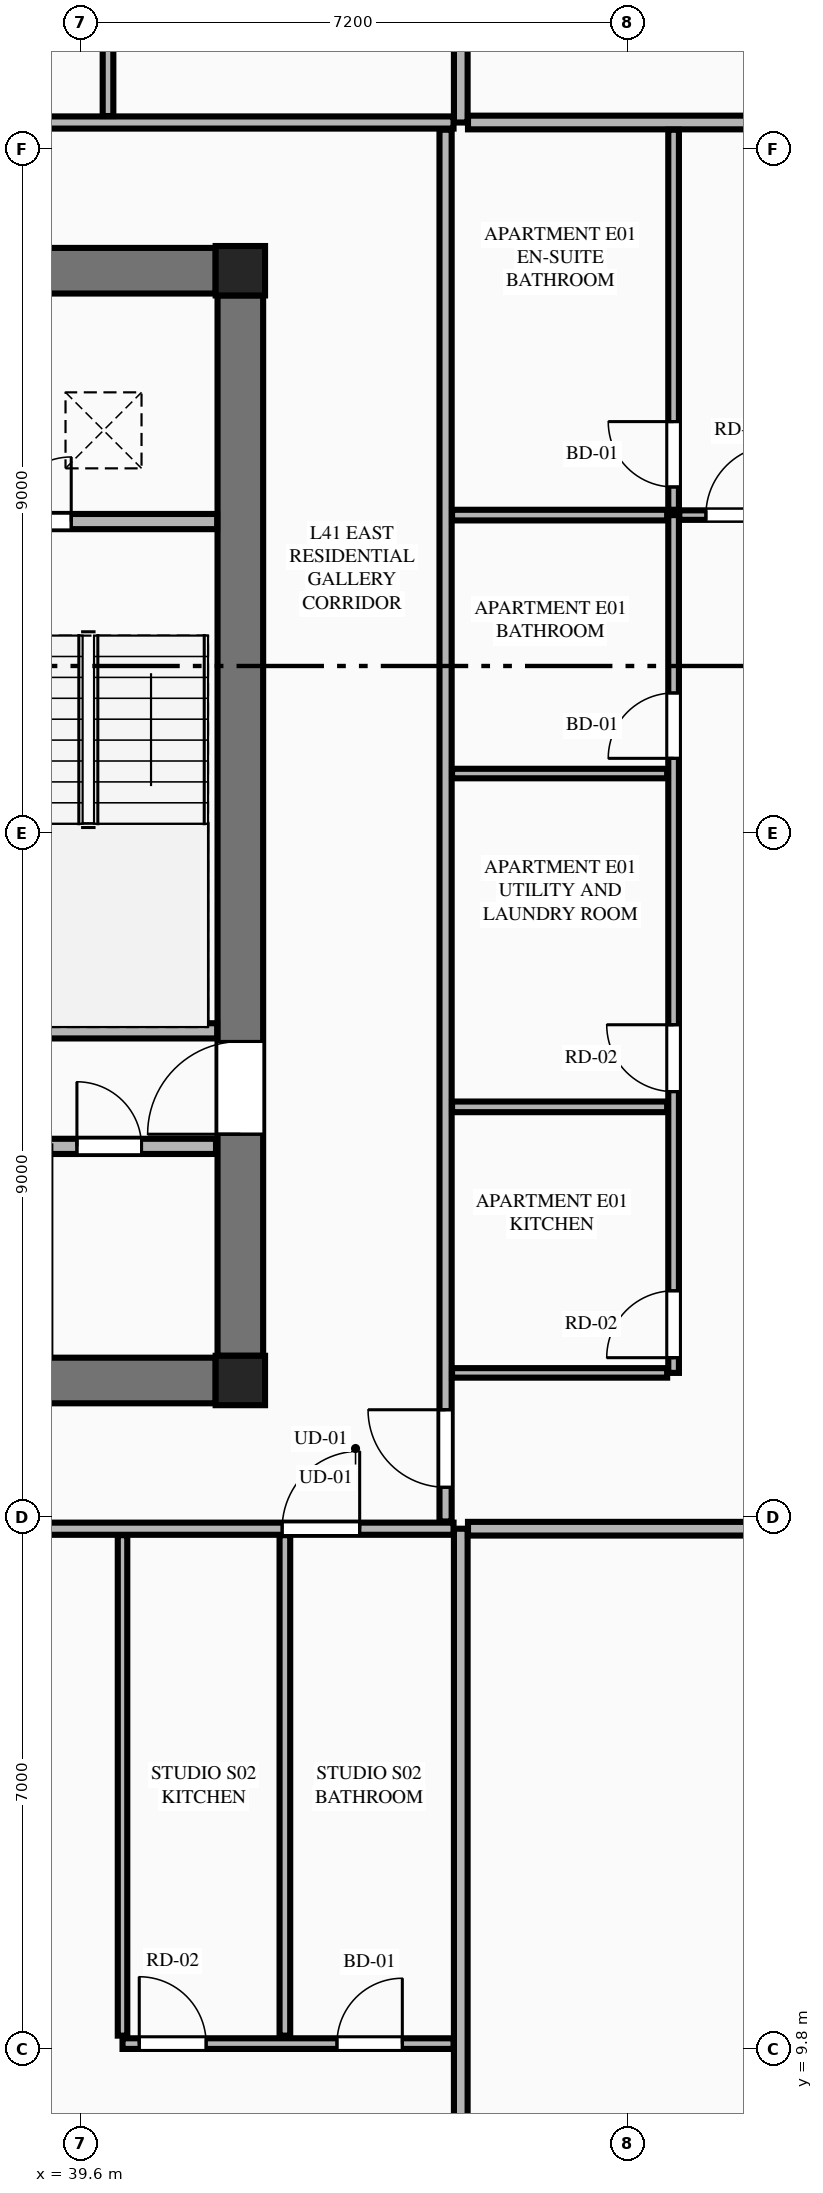
"""IFC4 building model, lengths in metres.
Left out: names, types, materials, properties, quantities, classifications, styles, units other than length and angle.
Written with IfcOpenShell. Run it as: python <this file> out.ifc"""

import sys

from ifc_helpers import new_model, si_unit, direction, frame, frame_2d, origin, origin_2d, place, context, subcontext, project, spatial, rectangle, extrude, element, fill, save


model = new_model("IFC4")
c1 = context("Model", 3, precision=1e-05, world=origin(), true_north=direction((0.0, 1.0)))
c2 = subcontext(c1, "Body", "Model", "MODEL_VIEW")
j1 = project(units=[si_unit("LENGTHUNIT", "METRE"), si_unit("PLANEANGLEUNIT", "RADIAN")], contexts=[c1])
p1 = place(None, origin())
s1 = spatial("IfcSite", under=j1, at=p1, CompositionType="ELEMENT")
p2 = place(p1, origin())
s2 = spatial("IfcBuilding", under=s1, at=p2, CompositionType="ELEMENT")
p3 = place(p2, frame((0.0, 0.0, 157.05)))
s3 = spatial("IfcBuildingStorey", under=s2, at=p3, CompositionType="ELEMENT", Elevation=157.05)
for number, where, z_axis, x_axis in (
    (1, (41.7, 18.6, 0.0), (0.0, 0.0, 1.0), (1.0, 0.0, 0.0)),
    (2, (41.7, 33.2, 0.0), (0.0, 0.0, 1.0), (1.0, 0.0, 0.0)),
):
    element("IfcColumn", number, at=place(p3, frame(where, z_axis=z_axis, x_axis=x_axis)), inside=s3, PredefinedType="COLUMN", context=c2, shape_type="SweptSolid", body=[
        extrude(rectangle(XDim=0.65, YDim=0.65, at=origin_2d()), origin(), (0.0, 0.0, 1.0), 3.55),
    ])
for number, where, z_axis, x_axis in (
    (3, (23.425, 18.6, 0.0), (0.0, 0.0, 1.0), (1.0, 0.0, 0.0)),
    (4, (23.425, 33.2, 0.0), (0.0, 0.0, 1.0), (1.0, 0.0, 0.0)),
):
    element("IfcWall", number, at=place(p3, frame(where, z_axis=z_axis, x_axis=x_axis)), inside=s3, PredefinedType="SHEAR", context=c2, shape_type="SweptSolid", body=[
        extrude(rectangle(XDim=17.95, YDim=0.6, at=frame_2d((8.975, 0.0))), origin(), (0.0, 0.0, 1.0), 3.34),
    ])
p4 = place(p3, frame((41.7, 18.925, 0.0), z_axis=(0.0, 0.0, 1.0), x_axis=(0.0, 1.0, 0.0)))
e5 = element("IfcWall", 5, at=p4, inside=s3, PredefinedType="SHEAR", context=c2, shape_type="SweptSolid", body=[
    extrude(rectangle(XDim=13.95, YDim=0.6, at=frame_2d((6.975, 0.0))), origin(), (0.0, 0.0, 1.0), 3.34),
])
p5 = place(p4, frame((2.915, 0.0, 0.0)))
e6 = element("IfcOpeningElement", 6, at=p5, cuts=e5, PredefinedType="OPENING", context=c2, shape_type="SweptSolid", body=[
    extrude(rectangle(XDim=1.22, YDim=2.25, at=frame_2d((0.61, 1.125))), frame((0.0, 0.31, 0.0), z_axis=(0.0, -1.0, 0.0), x_axis=(1.0, 0.0, 0.0)), (0.0, 0.0, 1.0), 0.62),
])
p6 = place(p3, frame((38.125, 23.2, 0.0), z_axis=(0.0, 0.0, 1.0), x_axis=(1.0, 0.0, 0.0)))
e7 = element("IfcWall", 7, at=p6, inside=s3, PredefinedType="PLUMBINGWALL", context=c2, shape_type="SweptSolid", body=[
    extrude(rectangle(XDim=3.27, YDim=0.2, at=frame_2d((1.635, 0.0))), origin(), (0.0, 0.0, 1.0), 3.34),
])
p7 = place(p3, frame((38.125, 29.9, 0.0), z_axis=(0.0, 0.0, 1.0), x_axis=(1.0, 0.0, 0.0)))
e8 = element("IfcWall", 8, at=p7, inside=s3, PredefinedType="PLUMBINGWALL", context=c2, shape_type="SweptSolid", body=[
    extrude(rectangle(XDim=3.27, YDim=0.2, at=frame_2d((1.635, 0.0))), origin(), (0.0, 0.0, 1.0), 3.34),
])
p8 = place(p7, frame((0.5, 0.0, 0.0)))
e9 = element("IfcOpeningElement", 9, at=p8, cuts=e8, PredefinedType="OPENING", context=c2, shape_type="SweptSolid", body=[
    extrude(rectangle(XDim=0.85, YDim=2.05, at=frame_2d((0.425, 1.025))), frame((0.0, 0.11, 0.0), z_axis=(0.0, -1.0, 0.0), x_axis=(1.0, 0.0, 0.0)), (0.0, 0.0, 1.0), 0.22),
])
p9 = place(p3, frame((23.42, 21.68, 0.0), z_axis=(0.0, 0.0, 1.0), x_axis=(1.0, 0.0, 0.0)))
e10 = element("IfcWall", 10, at=p9, inside=s3, PredefinedType="PLUMBINGWALL", context=c2, shape_type="SweptSolid", body=[
    extrude(rectangle(XDim=17.96, YDim=0.2, at=frame_2d((8.98, 0.0))), origin(), (0.0, 0.0, 1.0), 3.34),
])
p10 = place(p9, frame((11.6, 0.0, 0.0)))
e11 = element("IfcOpeningElement", 11, at=p10, cuts=e10, PredefinedType="OPENING", context=c2, shape_type="SweptSolid", body=[
    extrude(rectangle(XDim=1.1, YDim=2.2, at=frame_2d((0.55, 1.1))), frame((0.0, 0.11, 0.0), z_axis=(0.0, -1.0, 0.0), x_axis=(1.0, 0.0, 0.0)), (0.0, 0.0, 1.0), 0.22),
])
p11 = place(p9, frame((0.41, 0.0, 0.0)))
e12 = element("IfcOpeningElement", 12, at=p11, cuts=e10, PredefinedType="OPENING", context=c2, shape_type="SweptSolid", body=[
    extrude(rectangle(XDim=0.85, YDim=2.05, at=frame_2d((0.425, 1.025))), frame((0.0, 0.11, 0.0), z_axis=(0.0, -1.0, 0.0), x_axis=(1.0, 0.0, 0.0)), (0.0, 0.0, 1.0), 0.22),
])
p12 = place(p9, frame((13.78, 0.0, 0.0)))
e13 = element("IfcOpeningElement", 13, at=p12, cuts=e10, PredefinedType="OPENING", context=c2, shape_type="SweptSolid", body=[
    extrude(rectangle(XDim=0.85, YDim=2.05, at=frame_2d((0.425, 1.025))), frame((0.0, 0.11, 0.0), z_axis=(0.0, -1.0, 0.0), x_axis=(1.0, 0.0, 0.0)), (0.0, 0.0, 1.0), 0.22),
])
p13 = place(p9, frame((16.13, 0.0, 0.0)))
e14 = element("IfcOpeningElement", 14, at=p13, cuts=e10, PredefinedType="OPENING", context=c2, shape_type="SweptSolid", body=[
    extrude(rectangle(XDim=0.85, YDim=2.05, at=frame_2d((0.425, 1.025))), frame((0.0, 0.11, 0.0), z_axis=(0.0, -1.0, 0.0), x_axis=(1.0, 0.0, 0.0)), (0.0, 0.0, 1.0), 0.22),
])
p14 = place(p3, frame((47.937, 6.777, 0.0), z_axis=(0.0, 0.0, 1.0), x_axis=(0.451595734115, 0.892222670038, 0.0)))
e15 = element("IfcWall", 15, at=p14, inside=s3, PredefinedType="STANDARD", context=c2, shape_type="SweptSolid", body=[
    extrude(rectangle(XDim=5.208, YDim=0.34, at=frame_2d((2.604, 0.0))), origin(), (0.0, 0.0, 1.0), 2.797),
])
p15 = place(p14, frame((2.054, 0.0, 0.75)))
e16 = element("IfcOpeningElement", 16, at=p15, cuts=e15, PredefinedType="OPENING", context=c2, shape_type="SweptSolid", body=[
    extrude(rectangle(XDim=1.1, YDim=1.897, at=frame_2d((0.55, 0.948))), frame((0.0, 0.18, 0.0), z_axis=(0.0, -1.0, 0.0), x_axis=(1.0, 0.0, 0.0)), (0.0, 0.0, 1.0), 0.36),
])
p16 = place(p3, frame((44.6, 4.105, 0.0), z_axis=(0.0, 0.0, 1.0), x_axis=(0.0, 1.0, 0.0)))
e17 = element("IfcWall", 17, at=p16, inside=s3, PredefinedType="PARTITIONING", context=c2, shape_type="SweptSolid", body=[
    extrude(rectangle(XDim=12.545, YDim=0.18, at=frame_2d((6.272, 0.0))), origin(), (0.0, 0.0, 1.0), 3.34),
])
p17 = place(p3, frame((36.327, 16.65, 0.0), z_axis=(0.0, 0.0, 1.0), x_axis=(1.0, 0.0, 0.0)))
e18 = element("IfcWall", 18, at=p17, inside=s3, PredefinedType="PARTITIONING", context=c2, shape_type="SweptSolid", body=[
    extrude(rectangle(XDim=8.178, YDim=0.16, at=frame_2d((4.089, 0.0))), origin(), (0.0, 0.0, 1.0), 3.34),
])
p18 = place(p17, frame((5.923, 0.0, 0.0)))
e19 = element("IfcOpeningElement", 19, at=p18, cuts=e18, PredefinedType="OPENING", context=c2, shape_type="SweptSolid", body=[
    extrude(rectangle(XDim=1.02, YDim=2.25, at=frame_2d((0.51, 1.125))), frame((0.0, 0.09, 0.0), z_axis=(0.0, -1.0, 0.0), x_axis=(1.0, 0.0, 0.0)), (0.0, 0.0, 1.0), 0.18),
])
p19 = place(p3, frame((40.15, 9.981, 0.0), z_axis=(0.0, 0.0, 1.0), x_axis=(0.0, 1.0, 0.0)))
e20 = element("IfcWall", 20, at=p19, inside=s3, PredefinedType="PARTITIONING", context=c2, shape_type="SweptSolid", body=[
    extrude(rectangle(XDim=6.584, YDim=0.125, at=frame_2d((3.292, 0.0))), origin(), (0.0, 0.0, 1.0), 3.34),
])
p20 = place(p3, frame((40.15, 9.876, 0.0), z_axis=(0.0, 0.0, 1.0), x_axis=(1.0, 0.0, 0.0)))
e21 = element("IfcWall", 21, at=p20, inside=s3, PredefinedType="PLUMBINGWALL", context=c2, shape_type="SweptSolid", body=[
    extrude(rectangle(XDim=4.355, YDim=0.14, at=frame_2d((2.177, 0.0))), origin(), (0.0, 0.0, 1.0), 3.34),
])
p21 = place(p20, frame((2.821, 0.0, 0.0)))
e22 = element("IfcOpeningElement", 22, at=p21, cuts=e21, PredefinedType="OPENING", context=c2, shape_type="SweptSolid", body=[
    extrude(rectangle(XDim=0.86, YDim=2.1, at=frame_2d((0.43, 1.05))), frame((0.0, 0.08, 0.0), z_axis=(0.0, -1.0, 0.0), x_axis=(1.0, 0.0, 0.0)), (0.0, 0.0, 1.0), 0.16),
])
p22 = place(p20, frame((0.22, 0.0, 0.0)))
e23 = element("IfcOpeningElement", 23, at=p22, cuts=e21, PredefinedType="OPENING", context=c2, shape_type="SweptSolid", body=[
    extrude(rectangle(XDim=0.88, YDim=2.15, at=frame_2d((0.44, 1.075))), frame((0.0, 0.08, 0.0), z_axis=(0.0, -1.0, 0.0), x_axis=(1.0, 0.0, 0.0)), (0.0, 0.0, 1.0), 0.16),
])
p23 = place(p3, frame((42.286, 9.981, 0.0), z_axis=(0.0, 0.0, 1.0), x_axis=(0.0, 1.0, 0.0)))
e24 = element("IfcWall", 24, at=p23, inside=s3, PredefinedType="PLUMBINGWALL", context=c2, shape_type="SweptSolid", body=[
    extrude(rectangle(XDim=6.584, YDim=0.14, at=frame_2d((3.292, 0.0))), origin(), (0.0, 0.0, 1.0), 2.722),
])
p24 = place(p3, frame((44.6, 35.15, 0.0), z_axis=(0.0, 0.0, 1.0), x_axis=(0.0, 1.0, 0.0)))
e25 = element("IfcWall", 25, at=p24, inside=s3, PredefinedType="PARTITIONING", context=c2, shape_type="SweptSolid", body=[
    extrude(rectangle(XDim=12.345, YDim=0.18, at=frame_2d((6.173, 0.0))), origin(), (0.0, 0.0, 1.0), 3.34),
])
p25 = place(p3, frame((20.295, 35.15, 0.0), z_axis=(0.0, 0.0, 1.0), x_axis=(1.0, 0.0, 0.0)))
e26 = element("IfcWall", 26, at=p25, inside=s3, PredefinedType="PARTITIONING", context=c2, shape_type="SweptSolid", body=[
    extrude(rectangle(XDim=24.21, YDim=0.16, at=frame_2d((12.105, 0.0))), origin(), (0.0, 0.0, 1.0), 3.34),
])
p26 = place(p25, frame((0.405, 0.0, 0.0)))
e27 = element("IfcOpeningElement", 27, at=p26, cuts=e26, PredefinedType="OPENING", context=c2, shape_type="SweptSolid", body=[
    extrude(rectangle(XDim=1.35, YDim=2.35, at=frame_2d((0.675, 1.175))), frame((0.0, 0.09, 0.0), z_axis=(0.0, -1.0, 0.0), x_axis=(1.0, 0.0, 0.0)), (0.0, 0.0, 1.0), 0.18),
])
p27 = place(p3, frame((39.959, 35.235, 0.0), z_axis=(0.0, 0.0, 1.0), x_axis=(0.0, 1.0, 0.0)))
e28 = element("IfcWall", 28, at=p27, inside=s3, PredefinedType="PLUMBINGWALL", context=c2, shape_type="SweptSolid", body=[
    extrude(rectangle(XDim=4.625, YDim=0.14, at=frame_2d((2.312, 0.0))), origin(), (0.0, 0.0, 1.0), 3.34),
])
p28 = place(p3, frame((44.695, 16.65, 0.0), z_axis=(0.0, 0.0, 1.0), x_axis=(1.0, 0.0, 0.0)))
e29 = element("IfcWall", 29, at=p28, inside=s3, PredefinedType="PARTITIONING", context=c2, shape_type="SweptSolid", body=[
    extrude(rectangle(XDim=7.996, YDim=0.18, at=frame_2d((3.998, 0.0))), origin(), (0.0, 0.0, 1.0), 3.34),
])
p29 = place(p3, frame((44.695, 35.15, 0.0), z_axis=(0.0, 0.0, 1.0), x_axis=(1.0, 0.0, 0.0)))
e30 = element("IfcWall", 30, at=p29, inside=s3, PredefinedType="PARTITIONING", context=c2, shape_type="SweptSolid", body=[
    extrude(rectangle(XDim=7.895, YDim=0.18, at=frame_2d((3.948, 0.0))), origin(), (0.0, 0.0, 1.0), 3.34),
])
p30 = place(p3, frame((44.4, 16.745, 0.0), z_axis=(0.0, 0.0, 1.0), x_axis=(0.0, 1.0, 0.0)))
e31 = element("IfcWall", 31, at=p30, inside=s3, PredefinedType="PARTITIONING", context=c2, shape_type="SweptSolid", body=[
    extrude(rectangle(XDim=18.31, YDim=0.16, at=frame_2d((9.155, 0.0))), origin(), (0.0, 0.0, 1.0), 3.34),
])
p31 = place(p30, frame((0.45, 0.0, 0.0)))
e32 = element("IfcOpeningElement", 32, at=p31, cuts=e31, PredefinedType="OPENING", context=c2, shape_type="SweptSolid", body=[
    extrude(rectangle(XDim=1.02, YDim=2.25, at=frame_2d((0.51, 1.125))), frame((0.0, 0.09, 0.0), z_axis=(0.0, -1.0, 0.0), x_axis=(1.0, 0.0, 0.0)), (0.0, 0.0, 1.0), 0.18),
])
p32 = place(p3, frame((44.485, 18.7, 0.0), z_axis=(0.0, 0.0, 1.0), x_axis=(1.0, 0.0, 0.0)))
e33 = element("IfcWall", 33, at=p32, inside=s3, PredefinedType="PARTITIONING", context=c2, shape_type="SweptSolid", body=[
    extrude(rectangle(XDim=2.83, YDim=0.125, at=frame_2d((1.415, 0.0))), origin(), (0.0, 0.0, 1.0), 2.722),
])
p33 = place(p3, frame((47.4, 18.7, 0.0), z_axis=(0.0, 0.0, 1.0), x_axis=(0.0, 1.0, 0.0)))
e34 = element("IfcWall", 34, at=p33, inside=s3, PredefinedType="PLUMBINGWALL", context=c2, shape_type="SweptSolid", body=[
    extrude(rectangle(XDim=11.285, YDim=0.14, at=frame_2d((5.643, 0.0))), origin(), (0.0, 0.0, 1.0), 3.34),
])
p34 = place(p33, frame((0.2, 0.0, 0.0)))
e35 = element("IfcOpeningElement", 35, at=p34, cuts=e34, PredefinedType="OPENING", context=c2, shape_type="SweptSolid", body=[
    extrude(rectangle(XDim=0.88, YDim=2.15, at=frame_2d((0.44, 1.075))), frame((0.0, 0.08, 0.0), z_axis=(0.0, -1.0, 0.0), x_axis=(1.0, 0.0, 0.0)), (0.0, 0.0, 1.0), 0.16),
])
p35 = place(p33, frame((3.7, 0.0, 0.0)))
e36 = element("IfcOpeningElement", 36, at=p35, cuts=e34, PredefinedType="OPENING", context=c2, shape_type="SweptSolid", body=[
    extrude(rectangle(XDim=0.88, YDim=2.15, at=frame_2d((0.44, 1.075))), frame((0.0, 0.08, 0.0), z_axis=(0.0, -1.0, 0.0), x_axis=(1.0, 0.0, 0.0)), (0.0, 0.0, 1.0), 0.16),
])
p36 = place(p33, frame((8.085, 0.0, 0.0)))
e37 = element("IfcOpeningElement", 37, at=p36, cuts=e34, PredefinedType="OPENING", context=c2, shape_type="SweptSolid", body=[
    extrude(rectangle(XDim=0.86, YDim=2.1, at=frame_2d((0.43, 1.05))), frame((0.0, 0.08, 0.0), z_axis=(0.0, -1.0, 0.0), x_axis=(1.0, 0.0, 0.0)), (0.0, 0.0, 1.0), 0.16),
])
p37 = place(p3, frame((47.4, 30.055, 0.0), z_axis=(0.0, 0.0, 1.0), x_axis=(0.0, 1.0, 0.0)))
e38 = element("IfcWall", 38, at=p37, inside=s3, PredefinedType="PLUMBINGWALL", context=c2, shape_type="SweptSolid", body=[
    extrude(rectangle(XDim=5.0, YDim=0.14, at=frame_2d((2.5, 0.0))), origin(), (0.0, 0.0, 1.0), 3.34),
])
p38 = place(p37, frame((0.3, 0.0, 0.0)))
e39 = element("IfcOpeningElement", 39, at=p38, cuts=e38, PredefinedType="OPENING", context=c2, shape_type="SweptSolid", body=[
    extrude(rectangle(XDim=0.86, YDim=2.1, at=frame_2d((0.43, 1.05))), frame((0.0, 0.08, 0.0), z_axis=(0.0, -1.0, 0.0), x_axis=(1.0, 0.0, 0.0)), (0.0, 0.0, 1.0), 0.16),
])
p39 = place(p3, frame((44.485, 29.985, 0.0), z_axis=(0.0, 0.0, 1.0), x_axis=(1.0, 0.0, 0.0)))
e40 = element("IfcWall", 40, at=p39, inside=s3, PredefinedType="PLUMBINGWALL", context=c2, shape_type="SweptSolid", body=[
    extrude(rectangle(XDim=2.83, YDim=0.14, at=frame_2d((1.415, 0.0))), origin(), (0.0, 0.0, 1.0), 3.34),
])
p40 = place(p3, frame((47.475, 29.985, 0.0), z_axis=(0.0, 0.0, 1.0), x_axis=(1.0, 0.0, 0.0)))
e41 = element("IfcWall", 41, at=p40, inside=s3, PredefinedType="PARTITIONING", context=c2, shape_type="SweptSolid", body=[
    extrude(rectangle(XDim=7.743, YDim=0.125, at=frame_2d((3.872, 0.0))), origin(), (0.0, 0.0, 1.0), 3.34),
])
p41 = place(p40, frame((0.35, 0.0, 0.0)))
e42 = element("IfcOpeningElement", 42, at=p41, cuts=e41, PredefinedType="OPENING", context=c2, shape_type="SweptSolid", body=[
    extrude(rectangle(XDim=0.92, YDim=2.15, at=frame_2d((0.46, 1.075))), frame((0.0, 0.073, 0.0), z_axis=(0.0, -1.0, 0.0), x_axis=(1.0, 0.0, 0.0)), (0.0, 0.0, 1.0), 0.145),
])
p42 = place(p3, frame((44.485, 22.2, 0.0), z_axis=(0.0, 0.0, 1.0), x_axis=(1.0, 0.0, 0.0)))
e43 = element("IfcWall", 43, at=p42, inside=s3, PredefinedType="PLUMBINGWALL", context=c2, shape_type="SweptSolid", body=[
    extrude(rectangle(XDim=2.83, YDim=0.14, at=frame_2d((1.415, 0.0))), origin(), (0.0, 0.0, 1.0), 3.34),
])
p43 = place(p3, frame((44.485, 26.585, 0.0), z_axis=(0.0, 0.0, 1.0), x_axis=(1.0, 0.0, 0.0)))
e44 = element("IfcWall", 44, at=p43, inside=s3, PredefinedType="PARTITIONING", context=c2, shape_type="SweptSolid", body=[
    extrude(rectangle(XDim=2.83, YDim=0.125, at=frame_2d((1.415, 0.0))), origin(), (0.0, 0.0, 1.0), 3.34),
])
p44 = place(p5, origin())
e45 = element("IfcDoor", 45, at=p44, inside=s3, OperationType="SINGLE_SWING_LEFT", PredefinedType="DOOR", context=c2, shape_type="SweptSolid", body=[
    extrude(rectangle(XDim=1.22, YDim=2.25, at=frame_2d((0.61, 1.125))), frame((0.0, 0.025, 0.0), z_axis=(0.0, -1.0, 0.0), x_axis=(1.0, 0.0, 0.0)), (0.0, 0.0, 1.0), 0.05),
])
fill(e6, e45)
p45 = place(p8, origin())
e46 = element("IfcDoor", 46, at=p45, inside=s3, OperationType="SINGLE_SWING_RIGHT", PredefinedType="DOOR", context=c2, shape_type="SweptSolid", body=[
    extrude(rectangle(XDim=0.85, YDim=2.05, at=frame_2d((0.425, 1.025))), frame((0.0, 0.025, 0.0), z_axis=(0.0, -1.0, 0.0), x_axis=(1.0, 0.0, 0.0)), (0.0, 0.0, 1.0), 0.05),
])
fill(e9, e46)
p46 = place(p13, origin())
e47 = element("IfcDoor", 47, at=p46, inside=s3, OperationType="SINGLE_SWING_LEFT", PredefinedType="DOOR", context=c2, shape_type="SweptSolid", body=[
    extrude(rectangle(XDim=0.85, YDim=2.05, at=frame_2d((0.425, 1.025))), frame((0.0, 0.025, 0.0), z_axis=(0.0, -1.0, 0.0), x_axis=(1.0, 0.0, 0.0)), (0.0, 0.0, 1.0), 0.05),
])
fill(e14, e47)
p47 = place(p21, origin())
e48 = element("IfcDoor", 48, at=p47, inside=s3, OperationType="SINGLE_SWING_RIGHT", PredefinedType="DOOR", context=c2, shape_type="SweptSolid", body=[
    extrude(rectangle(XDim=0.86, YDim=2.1, at=frame_2d((0.43, 1.05))), frame((0.0, 0.025, 0.0), z_axis=(0.0, -1.0, 0.0), x_axis=(1.0, 0.0, 0.0)), (0.0, 0.0, 1.0), 0.05),
])
fill(e22, e48)
p48 = place(p18, origin())
e49 = element("IfcDoor", 49, at=p48, inside=s3, OperationType="SINGLE_SWING_RIGHT", PredefinedType="DOOR", context=c2, shape_type="SweptSolid", body=[
    extrude(rectangle(XDim=1.02, YDim=2.25, at=frame_2d((0.51, 1.125))), frame((0.0, 0.025, 0.0), z_axis=(0.0, -1.0, 0.0), x_axis=(1.0, 0.0, 0.0)), (0.0, 0.0, 1.0), 0.05),
])
fill(e19, e49)
p49 = place(p22, origin())
e50 = element("IfcDoor", 50, at=p49, inside=s3, OperationType="SINGLE_SWING_LEFT", PredefinedType="DOOR", context=c2, shape_type="SweptSolid", body=[
    extrude(rectangle(XDim=0.88, YDim=2.15, at=frame_2d((0.44, 1.075))), frame((0.0, 0.025, 0.0), z_axis=(0.0, -1.0, 0.0), x_axis=(1.0, 0.0, 0.0)), (0.0, 0.0, 1.0), 0.05),
])
fill(e23, e50)
p50 = place(p34, origin())
e51 = element("IfcDoor", 51, at=p50, inside=s3, OperationType="SINGLE_SWING_LEFT", PredefinedType="DOOR", context=c2, shape_type="SweptSolid", body=[
    extrude(rectangle(XDim=0.88, YDim=2.15, at=frame_2d((0.44, 1.075))), frame((0.0, 0.025, 0.0), z_axis=(0.0, -1.0, 0.0), x_axis=(1.0, 0.0, 0.0)), (0.0, 0.0, 1.0), 0.05),
])
fill(e35, e51)
p51 = place(p35, origin())
e52 = element("IfcDoor", 52, at=p51, inside=s3, OperationType="SINGLE_SWING_RIGHT", PredefinedType="DOOR", context=c2, shape_type="SweptSolid", body=[
    extrude(rectangle(XDim=0.88, YDim=2.15, at=frame_2d((0.44, 1.075))), frame((0.0, 0.025, 0.0), z_axis=(0.0, -1.0, 0.0), x_axis=(1.0, 0.0, 0.0)), (0.0, 0.0, 1.0), 0.05),
])
fill(e36, e52)
p52 = place(p36, origin())
e53 = element("IfcDoor", 53, at=p52, inside=s3, OperationType="SINGLE_SWING_LEFT", PredefinedType="DOOR", context=c2, shape_type="SweptSolid", body=[
    extrude(rectangle(XDim=0.86, YDim=2.1, at=frame_2d((0.43, 1.05))), frame((0.0, 0.025, 0.0), z_axis=(0.0, -1.0, 0.0), x_axis=(1.0, 0.0, 0.0)), (0.0, 0.0, 1.0), 0.05),
])
fill(e37, e53)
p53 = place(p38, origin())
e54 = element("IfcDoor", 54, at=p53, inside=s3, OperationType="SINGLE_SWING_RIGHT", PredefinedType="DOOR", context=c2, shape_type="SweptSolid", body=[
    extrude(rectangle(XDim=0.86, YDim=2.1, at=frame_2d((0.43, 1.05))), frame((0.0, 0.025, 0.0), z_axis=(0.0, -1.0, 0.0), x_axis=(1.0, 0.0, 0.0)), (0.0, 0.0, 1.0), 0.05),
])
fill(e39, e54)
p54 = place(p31, origin())
e55 = element("IfcDoor", 55, at=p54, inside=s3, OperationType="SINGLE_SWING_RIGHT", PredefinedType="DOOR", context=c2, shape_type="SweptSolid", body=[
    extrude(rectangle(XDim=1.02, YDim=2.25, at=frame_2d((0.51, 1.125))), frame((0.0, 0.025, 0.0), z_axis=(0.0, -1.0, 0.0), x_axis=(1.0, 0.0, 0.0)), (0.0, 0.0, 1.0), 0.05),
])
fill(e32, e55)
p55 = place(p41, origin())
e56 = element("IfcDoor", 56, at=p55, inside=s3, OperationType="SINGLE_SWING_RIGHT", PredefinedType="DOOR", context=c2, shape_type="SweptSolid", body=[
    extrude(rectangle(XDim=0.92, YDim=2.15, at=frame_2d((0.46, 1.075))), frame((0.0, 0.025, 0.0), z_axis=(0.0, -1.0, 0.0), x_axis=(1.0, 0.0, 0.0)), (0.0, 0.0, 1.0), 0.05),
])
fill(e42, e56)
save(model, sys.argv[1])
